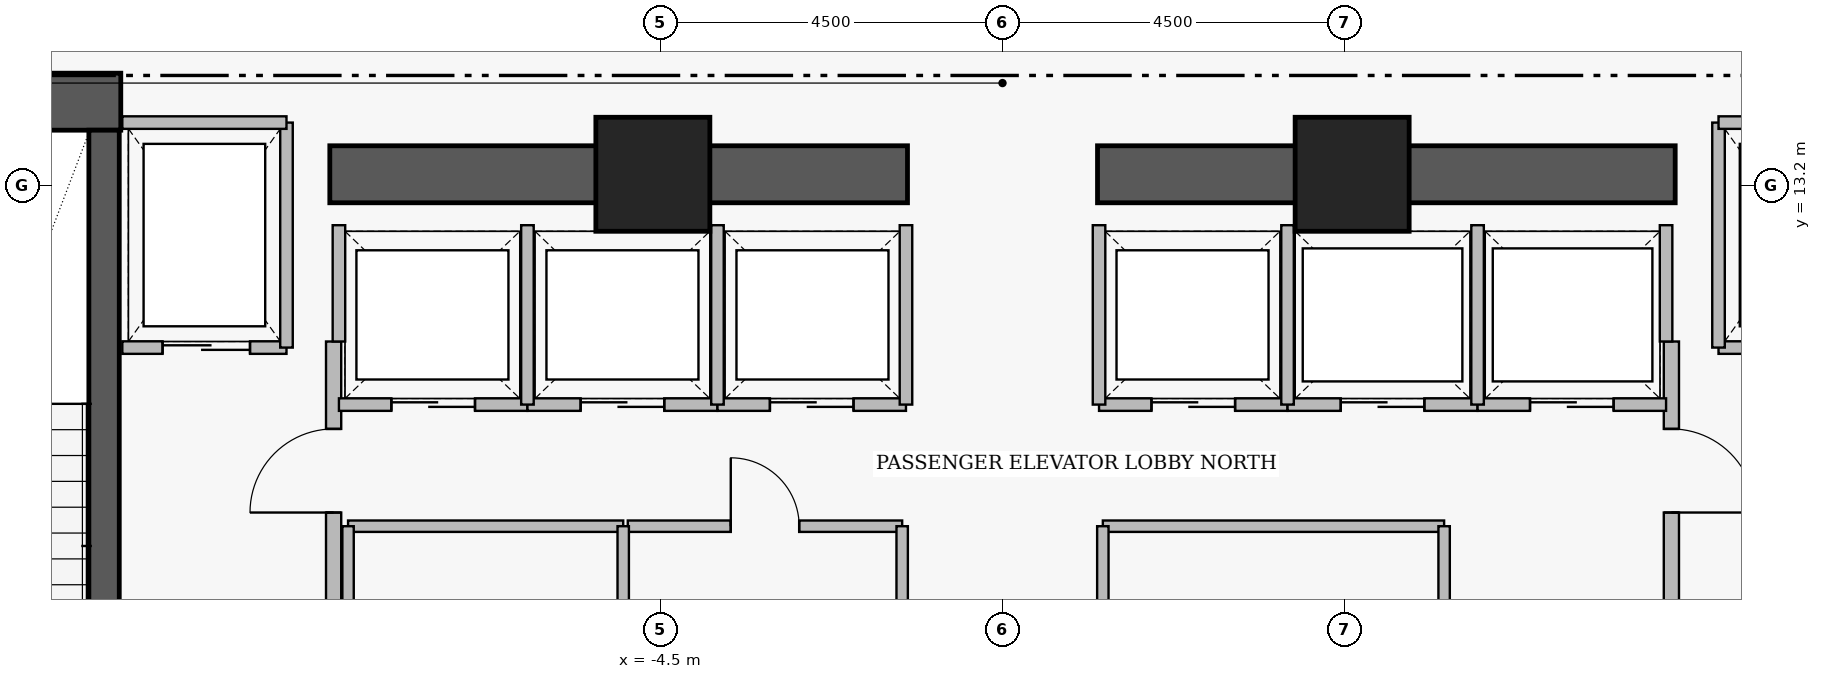
"""IFC4 building model, lengths in metres.
Left out: names, types, materials, properties, quantities, classifications, styles, units other than length and angle.
Written with IfcOpenShell. Run it as: python <this file> out.ifc"""

import sys

from ifc_helpers import new_model, si_unit, direction, frame, frame_2d, origin, origin_2d, place, context, subcontext, project, spatial, rectangle, extrude, element, fill, save


model = new_model("IFC4")
c1 = context("Model", 3, precision=1e-05, world=origin(), true_north=direction((0.0, 1.0)))
c2 = subcontext(c1, "Body", "Model", "MODEL_VIEW")
j1 = project(units=[si_unit("LENGTHUNIT", "METRE"), si_unit("PLANEANGLEUNIT", "RADIAN")], contexts=[c1])
p1 = place(None, origin())
s1 = spatial("IfcSite", under=j1, at=p1, CompositionType="ELEMENT")
p2 = place(p1, origin())
s2 = spatial("IfcBuilding", under=s1, at=p2, CompositionType="ELEMENT")
p3 = place(p2, frame((0.0, 0.0, 154.05)))
s3 = spatial("IfcBuildingStorey", under=s2, at=p3, CompositionType="ELEMENT", Elevation=154.05)
p4 = place(p3, frame((-16.16, 14.305, 0.0), z_axis=(0.0, 0.0, 1.0), x_axis=(1.0, 0.0, 0.0)))
e1 = element("IfcWall", 1, at=p4, inside=s3, PredefinedType="SHEAR", context=c2, shape_type="SweptSolid", body=[
    extrude(rectangle(XDim=4.56, YDim=0.75, at=frame_2d((2.28, 0.0))), origin(), (0.0, 0.0, 1.0), 4.31),
])
for number, where, z_axis, x_axis in (
    (2, (-8.85, 13.35, 0.0), (0.0, 0.0, 1.0), (1.0, 0.0, 0.0)),
    (3, (1.25, 13.35, 0.0), (0.0, 0.0, 1.0), (1.0, 0.0, 0.0)),
):
    element("IfcWall", number, at=place(p3, frame(where, z_axis=z_axis, x_axis=x_axis)), inside=s3, PredefinedType="SHEAR", context=c2, shape_type="SweptSolid", body=[
        extrude(rectangle(XDim=7.6, YDim=0.75, at=frame_2d((3.8, 0.0))), origin(), (0.0, 0.0, 1.0), 4.28),
    ])
p5 = place(p3, frame((-11.82, 4.97, 0.0), z_axis=(0.0, 0.0, 1.0), x_axis=(0.0, 1.0, 0.0)))
e4 = element("IfcWall", 4, at=p5, inside=s3, PredefinedType="SHEAR", context=c2, shape_type="SweptSolid", body=[
    extrude(rectangle(XDim=8.96, YDim=0.4, at=frame_2d((4.48, 0.0))), origin(), (0.0, 0.0, 1.0), 4.31),
])
p6 = place(p5, frame((0.31, 0.0, 0.0)))
e5 = element("IfcOpeningElement", 5, at=p6, cuts=e4, PredefinedType="OPENING", context=c2, shape_type="SweptSolid", body=[
    extrude(rectangle(XDim=1.12, YDim=2.22, at=frame_2d((0.56, 1.11))), frame((0.0, 0.21, 0.0), z_axis=(0.0, -1.0, 0.0), x_axis=(1.0, 0.0, 0.0)), (0.0, 0.0, 1.0), 0.42),
])
for number, where, z_axis, x_axis in (
    (6, (-4.6, 13.35, 0.0), (0.0, 0.0, 1.0), (1.0, 0.0, 0.0)),
    (7, (4.6, 13.35, 0.0), (0.0, 0.0, 1.0), (1.0, 0.0, 0.0)),
):
    element("IfcColumn", number, at=place(p3, frame(where, z_axis=z_axis, x_axis=x_axis)), inside=s3, PredefinedType="COLUMN", context=c2, shape_type="SweptSolid", body=[
        extrude(rectangle(XDim=1.5, YDim=1.5, at=origin_2d()), origin(), (0.0, 0.0, 1.0), 4.5),
    ])
p7 = place(p3, frame((-8.8, 5.05, 0.0), z_axis=(0.0, 0.0, 1.0), x_axis=(0.0, 1.0, 0.0)))
e8 = element("IfcWall", 8, at=p7, inside=s3, PredefinedType="PARTITIONING", context=c2, shape_type="SweptSolid", body=[
    extrude(rectangle(XDim=6.1, YDim=0.2, at=frame_2d((3.05, 0.0))), origin(), (0.0, 0.0, 1.0), 4.28),
])
p8 = place(p7, frame((0.25, 0.0, 0.0)))
e9 = element("IfcOpeningElement", 9, at=p8, cuts=e8, PredefinedType="OPENING", context=c2, shape_type="SweptSolid", body=[
    extrude(rectangle(XDim=1.1, YDim=2.2, at=frame_2d((0.55, 1.1))), frame((0.0, 0.11, 0.0), z_axis=(0.0, -1.0, 0.0), x_axis=(1.0, 0.0, 0.0)), (0.0, 0.0, 1.0), 0.22),
])
p9 = place(p7, frame((3.85, 0.0, 0.0)))
e10 = element("IfcOpeningElement", 10, at=p9, cuts=e8, PredefinedType="OPENING", context=c2, shape_type="SweptSolid", body=[
    extrude(rectangle(XDim=1.1, YDim=2.2, at=frame_2d((0.55, 1.1))), frame((0.0, 0.11, 0.0), z_axis=(0.0, -1.0, 0.0), x_axis=(1.0, 0.0, 0.0)), (0.0, 0.0, 1.0), 0.22),
])
p10 = place(p3, frame((8.8, 11.15, 0.0), z_axis=(0.0, 0.0, 1.0), x_axis=(0.0, -1.0, 0.0)))
e11 = element("IfcWall", 11, at=p10, inside=s3, PredefinedType="PARTITIONING", context=c2, shape_type="SweptSolid", body=[
    extrude(rectangle(XDim=6.1, YDim=0.2, at=frame_2d((3.05, 0.0))), origin(), (0.0, 0.0, 1.0), 4.28),
])
p11 = place(p10, frame((1.15, 0.0, 0.0)))
e12 = element("IfcOpeningElement", 12, at=p11, cuts=e11, PredefinedType="OPENING", context=c2, shape_type="SweptSolid", body=[
    extrude(rectangle(XDim=1.1, YDim=2.2, at=frame_2d((0.55, 1.1))), frame((0.0, 0.11, 0.0), z_axis=(0.0, -1.0, 0.0), x_axis=(1.0, 0.0, 0.0)), (0.0, 0.0, 1.0), 0.22),
])
p12 = place(p10, frame((4.75, 0.0, 0.0)))
e13 = element("IfcOpeningElement", 13, at=p12, cuts=e11, PredefinedType="OPENING", context=c2, shape_type="SweptSolid", body=[
    extrude(rectangle(XDim=1.1, YDim=2.2, at=frame_2d((0.55, 1.1))), frame((0.0, 0.11, 0.0), z_axis=(0.0, -1.0, 0.0), x_axis=(1.0, 0.0, 0.0)), (0.0, 0.0, 1.0), 0.22),
])
p13 = place(p3, frame((-11.58, 11.07, 0.0), z_axis=(0.0, 0.0, 1.0), x_axis=(1.0, 0.0, 0.0)))
e14 = element("IfcWall", 14, at=p13, inside=s3, PredefinedType="PARTITIONING", context=c2, shape_type="SweptSolid", body=[
    extrude(rectangle(XDim=2.16, YDim=0.165, at=frame_2d((1.08, 0.0))), origin(), (0.0, 0.0, 1.0), 4.28),
])
p14 = place(p13, frame((0.53, 0.0, 0.0)))
e15 = element("IfcOpeningElement", 15, at=p14, cuts=e14, PredefinedType="OPENING", context=c2, shape_type="SweptSolid", body=[
    extrude(rectangle(XDim=1.15, YDim=2.25, at=frame_2d((0.575, 1.125))), frame((0.0, 0.093, 0.0), z_axis=(0.0, -1.0, 0.0), x_axis=(1.0, 0.0, 0.0)), (0.0, 0.0, 1.0), 0.185),
])
p15 = place(p3, frame((9.42, 11.07, 0.0), z_axis=(0.0, 0.0, 1.0), x_axis=(1.0, 0.0, 0.0)))
e16 = element("IfcWall", 16, at=p15, inside=s3, PredefinedType="PARTITIONING", context=c2, shape_type="SweptSolid", body=[
    extrude(rectangle(XDim=2.16, YDim=0.165, at=frame_2d((1.08, 0.0))), origin(), (0.0, 0.0, 1.0), 4.28),
])
p16 = place(p15, frame((0.53, 0.0, 0.0)))
e17 = element("IfcOpeningElement", 17, at=p16, cuts=e16, PredefinedType="OPENING", context=c2, shape_type="SweptSolid", body=[
    extrude(rectangle(XDim=1.15, YDim=2.25, at=frame_2d((0.575, 1.125))), frame((0.0, 0.093, 0.0), z_axis=(0.0, -1.0, 0.0), x_axis=(1.0, 0.0, 0.0)), (0.0, 0.0, 1.0), 0.185),
])
p17 = place(p3, frame((-8.73, 10.32, 0.0), z_axis=(0.0, 0.0, 1.0), x_axis=(1.0, 0.0, 0.0)))
e18 = element("IfcWall", 18, at=p17, inside=s3, PredefinedType="PARTITIONING", context=c2, shape_type="SweptSolid", body=[
    extrude(rectangle(XDim=2.48, YDim=0.165, at=frame_2d((1.24, 0.0))), origin(), (0.0, 0.0, 1.0), 4.28),
])
p18 = place(p17, frame((0.69, 0.0, 0.0)))
e19 = element("IfcOpeningElement", 19, at=p18, cuts=e18, PredefinedType="OPENING", context=c2, shape_type="SweptSolid", body=[
    extrude(rectangle(XDim=1.1, YDim=2.25, at=frame_2d((0.55, 1.125))), frame((0.0, 0.093, 0.0), z_axis=(0.0, -1.0, 0.0), x_axis=(1.0, 0.0, 0.0)), (0.0, 0.0, 1.0), 0.185),
])
p19 = place(p3, frame((-6.25, 10.32, 0.0), z_axis=(0.0, 0.0, 1.0), x_axis=(1.0, 0.0, 0.0)))
e20 = element("IfcWall", 20, at=p19, inside=s3, PredefinedType="PARTITIONING", context=c2, shape_type="SweptSolid", body=[
    extrude(rectangle(XDim=2.5, YDim=0.165, at=frame_2d((1.25, 0.0))), origin(), (0.0, 0.0, 1.0), 4.28),
])
p20 = place(p19, frame((0.7, 0.0, 0.0)))
e21 = element("IfcOpeningElement", 21, at=p20, cuts=e20, PredefinedType="OPENING", context=c2, shape_type="SweptSolid", body=[
    extrude(rectangle(XDim=1.1, YDim=2.25, at=frame_2d((0.55, 1.125))), frame((0.0, 0.093, 0.0), z_axis=(0.0, -1.0, 0.0), x_axis=(1.0, 0.0, 0.0)), (0.0, 0.0, 1.0), 0.185),
])
p21 = place(p3, frame((-3.75, 10.32, 0.0), z_axis=(0.0, 0.0, 1.0), x_axis=(1.0, 0.0, 0.0)))
e22 = element("IfcWall", 22, at=p21, inside=s3, PredefinedType="PARTITIONING", context=c2, shape_type="SweptSolid", body=[
    extrude(rectangle(XDim=2.48, YDim=0.165, at=frame_2d((1.24, 0.0))), origin(), (0.0, 0.0, 1.0), 4.28),
])
p22 = place(p21, frame((0.69, 0.0, 0.0)))
e23 = element("IfcOpeningElement", 23, at=p22, cuts=e22, PredefinedType="OPENING", context=c2, shape_type="SweptSolid", body=[
    extrude(rectangle(XDim=1.1, YDim=2.25, at=frame_2d((0.55, 1.125))), frame((0.0, 0.093, 0.0), z_axis=(0.0, -1.0, 0.0), x_axis=(1.0, 0.0, 0.0)), (0.0, 0.0, 1.0), 0.185),
])
p23 = place(p3, frame((1.27, 10.32, 0.0), z_axis=(0.0, 0.0, 1.0), x_axis=(1.0, 0.0, 0.0)))
e24 = element("IfcWall", 24, at=p23, inside=s3, PredefinedType="PARTITIONING", context=c2, shape_type="SweptSolid", body=[
    extrude(rectangle(XDim=2.48, YDim=0.165, at=frame_2d((1.24, 0.0))), origin(), (0.0, 0.0, 1.0), 4.28),
])
p24 = place(p23, frame((0.69, 0.0, 0.0)))
e25 = element("IfcOpeningElement", 25, at=p24, cuts=e24, PredefinedType="OPENING", context=c2, shape_type="SweptSolid", body=[
    extrude(rectangle(XDim=1.1, YDim=2.25, at=frame_2d((0.55, 1.125))), frame((0.0, 0.093, 0.0), z_axis=(0.0, -1.0, 0.0), x_axis=(1.0, 0.0, 0.0)), (0.0, 0.0, 1.0), 0.185),
])
p25 = place(p3, frame((3.75, 10.32, 0.0), z_axis=(0.0, 0.0, 1.0), x_axis=(1.0, 0.0, 0.0)))
e26 = element("IfcWall", 26, at=p25, inside=s3, PredefinedType="PARTITIONING", context=c2, shape_type="SweptSolid", body=[
    extrude(rectangle(XDim=2.5, YDim=0.165, at=frame_2d((1.25, 0.0))), origin(), (0.0, 0.0, 1.0), 4.28),
])
p26 = place(p25, frame((0.7, 0.0, 0.0)))
e27 = element("IfcOpeningElement", 27, at=p26, cuts=e26, PredefinedType="OPENING", context=c2, shape_type="SweptSolid", body=[
    extrude(rectangle(XDim=1.1, YDim=2.25, at=frame_2d((0.55, 1.125))), frame((0.0, 0.093, 0.0), z_axis=(0.0, -1.0, 0.0), x_axis=(1.0, 0.0, 0.0)), (0.0, 0.0, 1.0), 0.185),
])
p27 = place(p3, frame((6.25, 10.32, 0.0), z_axis=(0.0, 0.0, 1.0), x_axis=(1.0, 0.0, 0.0)))
e28 = element("IfcWall", 28, at=p27, inside=s3, PredefinedType="PARTITIONING", context=c2, shape_type="SweptSolid", body=[
    extrude(rectangle(XDim=2.48, YDim=0.165, at=frame_2d((1.24, 0.0))), origin(), (0.0, 0.0, 1.0), 4.28),
])
p28 = place(p27, frame((0.69, 0.0, 0.0)))
e29 = element("IfcOpeningElement", 29, at=p28, cuts=e28, PredefinedType="OPENING", context=c2, shape_type="SweptSolid", body=[
    extrude(rectangle(XDim=1.1, YDim=2.25, at=frame_2d((0.55, 1.125))), frame((0.0, 0.093, 0.0), z_axis=(0.0, -1.0, 0.0), x_axis=(1.0, 0.0, 0.0)), (0.0, 0.0, 1.0), 0.185),
])
p29 = place(p3, frame((-4.93, 8.72, 0.0), z_axis=(0.0, 0.0, 1.0), x_axis=(1.0, 0.0, 0.0)))
e30 = element("IfcWall", 30, at=p29, inside=s3, PredefinedType="PARTITIONING", context=c2, shape_type="SweptSolid", body=[
    extrude(rectangle(XDim=3.61, YDim=0.15, at=frame_2d((1.805, 0.0))), origin(), (0.0, 0.0, 1.0), 4.28),
])
p30 = place(p29, frame((1.355, 0.0, 0.0)))
e31 = element("IfcOpeningElement", 31, at=p30, cuts=e30, PredefinedType="OPENING", context=c2, shape_type="SweptSolid", body=[
    extrude(rectangle(XDim=0.9, YDim=2.15, at=frame_2d((0.45, 1.075))), frame((0.0, 0.085, 0.0), z_axis=(0.0, -1.0, 0.0), x_axis=(1.0, 0.0, 0.0)), (0.0, 0.0, 1.0), 0.17),
])
p31 = place(p3, frame((-9.42, 11.07, 0.0), z_axis=(0.0, 0.0, 1.0), x_axis=(0.0, 1.0, 0.0)))
e32 = element("IfcWall", 32, at=p31, inside=s3, PredefinedType="PARTITIONING", context=c2, shape_type="SweptSolid", body=[
    extrude(rectangle(XDim=2.96, YDim=0.165, at=frame_2d((1.48, 0.0))), origin(), (0.0, 0.0, 1.0), 4.28),
])
p32 = place(p3, frame((-11.58, 14.03, 0.0), z_axis=(0.0, 0.0, 1.0), x_axis=(1.0, 0.0, 0.0)))
e33 = element("IfcWall", 33, at=p32, inside=s3, PredefinedType="PARTITIONING", context=c2, shape_type="SweptSolid", body=[
    extrude(rectangle(XDim=2.16, YDim=0.165, at=frame_2d((1.08, 0.0))), origin(), (0.0, 0.0, 1.0), 4.28),
])
p33 = place(p3, frame((9.42, 11.07, 0.0), z_axis=(0.0, 0.0, 1.0), x_axis=(0.0, 1.0, 0.0)))
e34 = element("IfcWall", 34, at=p33, inside=s3, PredefinedType="PARTITIONING", context=c2, shape_type="SweptSolid", body=[
    extrude(rectangle(XDim=2.96, YDim=0.165, at=frame_2d((1.48, 0.0))), origin(), (0.0, 0.0, 1.0), 4.28),
])
p34 = place(p3, frame((9.42, 14.03, 0.0), z_axis=(0.0, 0.0, 1.0), x_axis=(1.0, 0.0, 0.0)))
e35 = element("IfcWall", 35, at=p34, inside=s3, PredefinedType="PARTITIONING", context=c2, shape_type="SweptSolid", body=[
    extrude(rectangle(XDim=2.16, YDim=0.165, at=frame_2d((1.08, 0.0))), origin(), (0.0, 0.0, 1.0), 4.28),
])
p35 = place(p3, frame((-8.73, 11.15, 0.0), z_axis=(0.0, 0.0, 1.0), x_axis=(0.0, 1.0, 0.0)))
e36 = element("IfcWall", 36, at=p35, inside=s3, PredefinedType="PARTITIONING", context=c2, shape_type="SweptSolid", body=[
    extrude(rectangle(XDim=1.53, YDim=0.165, at=frame_2d((0.765, 0.0))), origin(), (0.0, 0.0, 1.0), 4.28),
])
for number, where, z_axis, x_axis in (
    (37, (-6.25, 10.32, 0.0), (0.0, 0.0, 1.0), (0.0, 1.0, 0.0)),
    (38, (-3.75, 10.32, 0.0), (0.0, 0.0, 1.0), (0.0, 1.0, 0.0)),
    (39, (-1.27, 10.32, 0.0), (0.0, 0.0, 1.0), (0.0, 1.0, 0.0)),
    (40, (1.27, 10.32, 0.0), (0.0, 0.0, 1.0), (0.0, 1.0, 0.0)),
    (41, (3.75, 10.32, 0.0), (0.0, 0.0, 1.0), (0.0, 1.0, 0.0)),
    (42, (6.25, 10.32, 0.0), (0.0, 0.0, 1.0), (0.0, 1.0, 0.0)),
):
    element("IfcWall", number, at=place(p3, frame(where, z_axis=z_axis, x_axis=x_axis)), inside=s3, PredefinedType="PARTITIONING", context=c2, shape_type="SweptSolid", body=[
        extrude(rectangle(XDim=2.36, YDim=0.165, at=frame_2d((1.18, 0.0))), origin(), (0.0, 0.0, 1.0), 4.28),
    ])
p36 = place(p3, frame((8.73, 11.15, 0.0), z_axis=(0.0, 0.0, 1.0), x_axis=(0.0, 1.0, 0.0)))
e43 = element("IfcWall", 43, at=p36, inside=s3, PredefinedType="PARTITIONING", context=c2, shape_type="SweptSolid", body=[
    extrude(rectangle(XDim=1.53, YDim=0.165, at=frame_2d((0.765, 0.0))), origin(), (0.0, 0.0, 1.0), 4.28),
])
p37 = place(p3, frame((-8.61, 8.72, 0.0), z_axis=(0.0, 0.0, 1.0), x_axis=(1.0, 0.0, 0.0)))
e44 = element("IfcWall", 44, at=p37, inside=s3, PredefinedType="PARTITIONING", context=c2, shape_type="SweptSolid", body=[
    extrude(rectangle(XDim=3.62, YDim=0.15, at=frame_2d((1.81, 0.0))), origin(), (0.0, 0.0, 1.0), 4.28),
])
for number, where, z_axis, x_axis in (
    (45, (-8.61, 6.48, 0.0), (0.0, 0.0, 1.0), (0.0, 1.0, 0.0)),
    (46, (-4.99, 6.48, 0.0), (0.0, 0.0, 1.0), (0.0, 1.0, 0.0)),
    (47, (-1.32, 6.48, 0.0), (0.0, 0.0, 1.0), (0.0, 1.0, 0.0)),
):
    element("IfcWall", number, at=place(p3, frame(where, z_axis=z_axis, x_axis=x_axis)), inside=s3, PredefinedType="PARTITIONING", context=c2, shape_type="SweptSolid", body=[
        extrude(rectangle(XDim=2.24, YDim=0.15, at=frame_2d((1.12, 0.0))), origin(), (0.0, 0.0, 1.0), 4.28),
    ])
p38 = place(p3, frame((1.32, 8.72, 0.0), z_axis=(0.0, 0.0, 1.0), x_axis=(1.0, 0.0, 0.0)))
e48 = element("IfcWall", 48, at=p38, inside=s3, PredefinedType="PARTITIONING", context=c2, shape_type="SweptSolid", body=[
    extrude(rectangle(XDim=4.49, YDim=0.15, at=frame_2d((2.245, 0.0))), origin(), (0.0, 0.0, 1.0), 4.28),
])
for number, where, z_axis, x_axis in (
    (49, (1.32, 6.48, 0.0), (0.0, 0.0, 1.0), (0.0, 1.0, 0.0)),
    (50, (5.81, 6.48, 0.0), (0.0, 0.0, 1.0), (0.0, 1.0, 0.0)),
):
    element("IfcWall", number, at=place(p3, frame(where, z_axis=z_axis, x_axis=x_axis)), inside=s3, PredefinedType="PARTITIONING", context=c2, shape_type="SweptSolid", body=[
        extrude(rectangle(XDim=2.24, YDim=0.15, at=frame_2d((1.12, 0.0))), origin(), (0.0, 0.0, 1.0), 4.28),
    ])
p39 = place(p9, origin())
e51 = element("IfcDoor", 51, at=p39, inside=s3, OperationType="SINGLE_SWING_LEFT", PredefinedType="DOOR", context=c2, shape_type="SweptSolid", body=[
    extrude(rectangle(XDim=1.1, YDim=2.2, at=frame_2d((0.55, 1.1))), frame((0.0, 0.025, 0.0), z_axis=(0.0, -1.0, 0.0), x_axis=(1.0, 0.0, 0.0)), (0.0, 0.0, 1.0), 0.05),
])
fill(e10, e51)
p40 = place(p11, origin())
e52 = element("IfcDoor", 52, at=p40, inside=s3, OperationType="SINGLE_SWING_RIGHT", PredefinedType="DOOR", context=c2, shape_type="SweptSolid", body=[
    extrude(rectangle(XDim=1.1, YDim=2.2, at=frame_2d((0.55, 1.1))), frame((0.0, 0.025, 0.0), z_axis=(0.0, -1.0, 0.0), x_axis=(1.0, 0.0, 0.0)), (0.0, 0.0, 1.0), 0.05),
])
fill(e12, e52)
p41 = place(p14, origin())
e53 = element("IfcDoor", 53, at=p41, inside=s3, OperationType="SLIDING_TO_LEFT", PredefinedType="DOOR", context=c2, shape_type="SweptSolid", body=[
    extrude(rectangle(XDim=1.15, YDim=2.25, at=frame_2d((0.575, 1.125))), frame((0.0, 0.025, 0.0), z_axis=(0.0, -1.0, 0.0), x_axis=(1.0, 0.0, 0.0)), (0.0, 0.0, 1.0), 0.05),
])
fill(e15, e53)
p42 = place(p18, origin())
e54 = element("IfcDoor", 54, at=p42, inside=s3, OperationType="SLIDING_TO_LEFT", PredefinedType="DOOR", context=c2, shape_type="SweptSolid", body=[
    extrude(rectangle(XDim=1.1, YDim=2.25, at=frame_2d((0.55, 1.125))), frame((0.0, 0.025, 0.0), z_axis=(0.0, -1.0, 0.0), x_axis=(1.0, 0.0, 0.0)), (0.0, 0.0, 1.0), 0.05),
])
fill(e19, e54)
p43 = place(p20, origin())
e55 = element("IfcDoor", 55, at=p43, inside=s3, OperationType="SLIDING_TO_LEFT", PredefinedType="DOOR", context=c2, shape_type="SweptSolid", body=[
    extrude(rectangle(XDim=1.1, YDim=2.25, at=frame_2d((0.55, 1.125))), frame((0.0, 0.025, 0.0), z_axis=(0.0, -1.0, 0.0), x_axis=(1.0, 0.0, 0.0)), (0.0, 0.0, 1.0), 0.05),
])
fill(e21, e55)
p44 = place(p22, origin())
e56 = element("IfcDoor", 56, at=p44, inside=s3, OperationType="SLIDING_TO_LEFT", PredefinedType="DOOR", context=c2, shape_type="SweptSolid", body=[
    extrude(rectangle(XDim=1.1, YDim=2.25, at=frame_2d((0.55, 1.125))), frame((0.0, 0.025, 0.0), z_axis=(0.0, -1.0, 0.0), x_axis=(1.0, 0.0, 0.0)), (0.0, 0.0, 1.0), 0.05),
])
fill(e23, e56)
p45 = place(p24, origin())
e57 = element("IfcDoor", 57, at=p45, inside=s3, OperationType="SLIDING_TO_LEFT", PredefinedType="DOOR", context=c2, shape_type="SweptSolid", body=[
    extrude(rectangle(XDim=1.1, YDim=2.25, at=frame_2d((0.55, 1.125))), frame((0.0, 0.025, 0.0), z_axis=(0.0, -1.0, 0.0), x_axis=(1.0, 0.0, 0.0)), (0.0, 0.0, 1.0), 0.05),
])
fill(e25, e57)
p46 = place(p26, origin())
e58 = element("IfcDoor", 58, at=p46, inside=s3, OperationType="SLIDING_TO_LEFT", PredefinedType="DOOR", context=c2, shape_type="SweptSolid", body=[
    extrude(rectangle(XDim=1.1, YDim=2.25, at=frame_2d((0.55, 1.125))), frame((0.0, 0.025, 0.0), z_axis=(0.0, -1.0, 0.0), x_axis=(1.0, 0.0, 0.0)), (0.0, 0.0, 1.0), 0.05),
])
fill(e27, e58)
p47 = place(p28, origin())
e59 = element("IfcDoor", 59, at=p47, inside=s3, OperationType="SLIDING_TO_LEFT", PredefinedType="DOOR", context=c2, shape_type="SweptSolid", body=[
    extrude(rectangle(XDim=1.1, YDim=2.25, at=frame_2d((0.55, 1.125))), frame((0.0, 0.025, 0.0), z_axis=(0.0, -1.0, 0.0), x_axis=(1.0, 0.0, 0.0)), (0.0, 0.0, 1.0), 0.05),
])
fill(e29, e59)
p48 = place(p30, origin())
e60 = element("IfcDoor", 60, at=p48, inside=s3, OperationType="SINGLE_SWING_LEFT", PredefinedType="DOOR", context=c2, shape_type="SweptSolid", body=[
    extrude(rectangle(XDim=0.9, YDim=2.15, at=frame_2d((0.45, 1.075))), frame((0.0, 0.025, 0.0), z_axis=(0.0, -1.0, 0.0), x_axis=(1.0, 0.0, 0.0)), (0.0, 0.0, 1.0), 0.05),
])
fill(e31, e60)
save(model, sys.argv[1])
